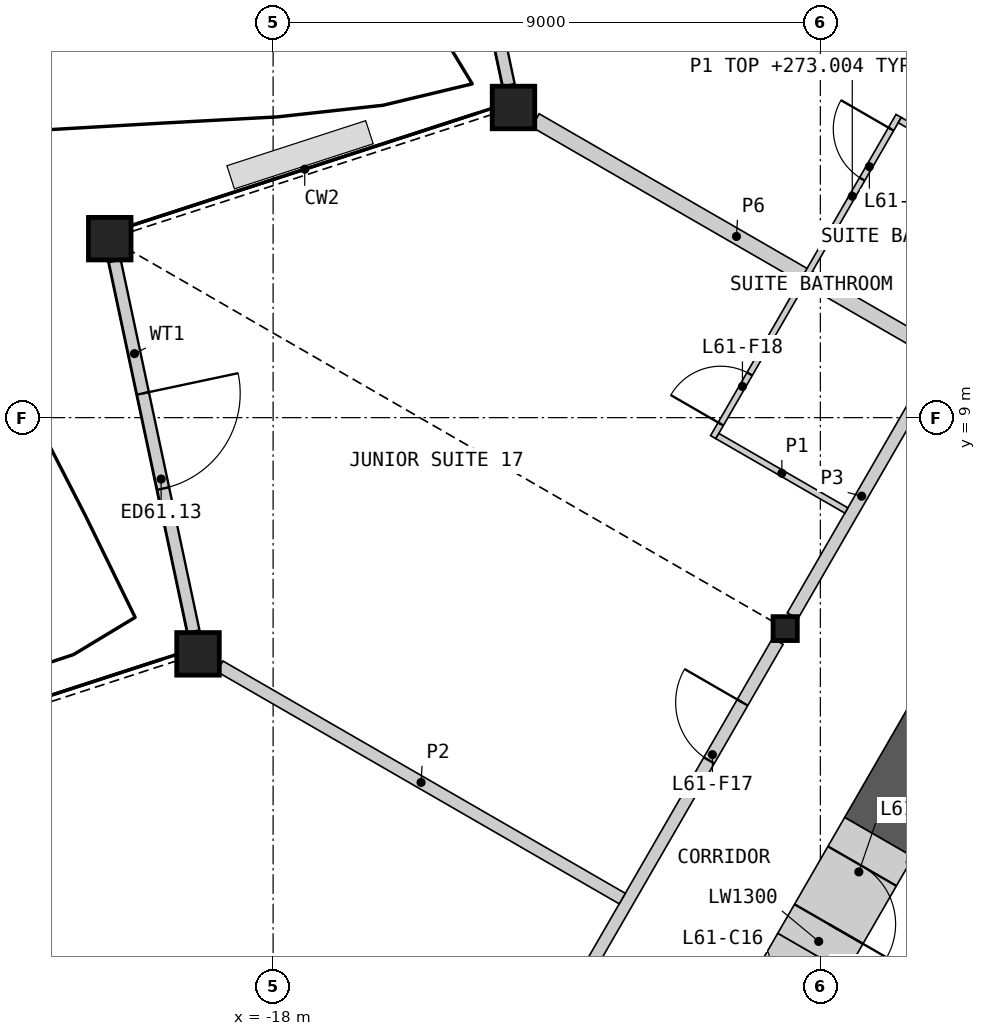
"""IFC4 building model, lengths in metres.
Left out: names, types, materials, properties, quantities, classifications, styles, units other than length and angle.
Written with IfcOpenShell. Run it as: python <this file> out.ifc"""

import sys

from ifc_helpers import new_model, si_unit, direction, frame, frame_2d, origin, origin_2d, place, context, subcontext, project, spatial, rectangle, hollow_rectangle, i_section, extrude, element, fill, save


model = new_model("IFC4")
c1 = context("Model", 3, precision=1e-05, world=origin(), true_north=direction((0.0, 1.0)))
c2 = subcontext(c1, "Body", "Model", "MODEL_VIEW")
j1 = project(units=[si_unit("LENGTHUNIT", "METRE"), si_unit("PLANEANGLEUNIT", "RADIAN")], contexts=[c1])
p1 = place(None, origin())
s1 = spatial("IfcSite", under=j1, at=p1, CompositionType="ELEMENT")
p2 = place(p1, origin())
s2 = spatial("IfcBuilding", under=s1, at=p2, CompositionType="ELEMENT")
p3 = place(p2, frame((0.0, 0.0, 270.6)))
s3 = spatial("IfcBuildingStorey", under=s2, at=p3, CompositionType="ELEMENT", Elevation=270.6)
for number, where, z_axis, x_axis in (
    (1, (-14.047, 14.101, 0.0), (0.0, 0.0, 1.0), (1.0, 0.0, 0.0)),
    (2, (-20.687, 11.943, 0.0), (0.0, 0.0, 1.0), (1.0, 0.0, 0.0)),
    (3, (-19.235, 5.115, 0.0), (0.0, 0.0, 1.0), (1.0, 0.0, 0.0)),
):
    element("IfcColumn", number, at=place(p3, frame(where, z_axis=z_axis, x_axis=x_axis)), inside=s3, PredefinedType="COLUMN", context=c2, shape_type="SweptSolid", body=[
        extrude(hollow_rectangle(XDim=0.7, YDim=0.7, WallThickness=0.045, at=origin_2d()), origin(), (0.0, 0.0, 1.0), 3.6),
    ])
p4 = place(p3, frame((-9.578, 5.53, 0.0), z_axis=(0.0, 0.0, 1.0), x_axis=(1.0, 0.0, 0.0)))
e4 = element("IfcColumn", 4, at=p4, inside=s3, PredefinedType="COLUMN", context=c2, shape_type="SweptSolid", body=[
    extrude(i_section(OverallWidth=0.399, OverallDepth=0.393, WebThickness=0.023, FlangeThickness=0.037, at=origin_2d()), origin(), (0.0, 0.0, 1.0), 3.6),
])
p5 = place(p3, frame((-15.42, 20.563, 0.0), z_axis=(0.0, 0.0, 1.0), x_axis=(0.207907484076, -0.978148494895, 0.0)))
e5 = element("IfcWall", 5, at=p5, inside=s3, PredefinedType="SOLIDWALL", context=c2, shape_type="SweptSolid", body=[
    extrude(rectangle(XDim=6.232, YDim=0.2, at=frame_2d((3.116, 0.0))), origin(), (0.0, 0.0, 1.0), 2.701),
])
p6 = place(p5, frame((2.232, 0.0, 0.0)))
e6 = element("IfcOpeningElement", 6, at=p6, cuts=e5, PredefinedType="OPENING", context=c2, shape_type="SweptSolid", body=[
    extrude(rectangle(XDim=1.6, YDim=2.4, at=frame_2d((0.8, 1.2))), frame((0.0, 0.11, 0.0), z_axis=(0.0, -1.0, 0.0), x_axis=(1.0, 0.0, 0.0)), (0.0, 0.0, 1.0), 0.22),
])
p7 = place(p3, frame((-20.604, 11.577, 0.0), z_axis=(0.0, 0.0, 1.0), x_axis=(0.207907484076, -0.978148494895, 0.0)))
e7 = element("IfcWall", 7, at=p7, inside=s3, PredefinedType="SOLIDWALL", context=c2, shape_type="SweptSolid", body=[
    extrude(rectangle(XDim=6.232, YDim=0.2, at=frame_2d((3.116, 0.0))), origin(), (0.0, 0.0, 1.0), 2.701),
])
p8 = place(p7, frame((2.227, 0.0, 0.0)))
e8 = element("IfcOpeningElement", 8, at=p8, cuts=e7, PredefinedType="OPENING", context=c2, shape_type="SweptSolid", body=[
    extrude(rectangle(XDim=1.6, YDim=2.4, at=frame_2d((0.8, 1.2))), frame((0.0, 0.11, 0.0), z_axis=(0.0, -1.0, 0.0), x_axis=(1.0, 0.0, 0.0)), (0.0, 0.0, 1.0), 0.22),
])
p9 = place(p3, frame((-3.812, 9.418, 0.0), z_axis=(0.0, 0.0, 1.0), x_axis=(-0.499995037753, -0.86602826872, 0.0)))
e9 = element("IfcWall", 9, at=p9, inside=s3, PredefinedType="SHEAR", context=c2, shape_type="SweptSolid", body=[
    extrude(rectangle(XDim=8.451, YDim=1.3, at=frame_2d((4.225, 0.0))), origin(), (0.0, 0.0, 1.0), 3.25),
])
p10 = place(p3, frame((-9.137, 0.195, 0.0), z_axis=(0.0, 0.0, 1.0), x_axis=(-0.500009943768, -0.866019662671, 0.0)))
e10 = element("IfcWall", 10, at=p10, inside=s3, PredefinedType="SHEAR", context=c2, shape_type="SweptSolid", body=[
    extrude(rectangle(XDim=2.401, YDim=1.3, at=frame_2d((1.201, 0.0))), origin(), (0.0, 0.0, 1.0), 3.25),
])
p11 = place(p10, frame((0.8, 0.0, 0.0)))
e11 = element("IfcOpeningElement", 11, at=p11, cuts=e10, PredefinedType="OPENING", context=c2, shape_type="SweptSolid", body=[
    extrude(rectangle(XDim=1.0, YDim=2.1, at=frame_2d((0.5, 1.05))), frame((0.0, 0.66, 0.0), z_axis=(0.0, -1.0, 0.0), x_axis=(1.0, 0.0, 0.0)), (0.0, 0.0, 1.0), 1.32),
])
p12 = place(p3, frame((-8.037, 2.1, 0.0), z_axis=(0.0, 0.0, 1.0), x_axis=(-0.50002983664, -0.866008176907, 0.0)))
e12 = element("IfcWall", 12, at=p12, inside=s3, PredefinedType="SHEAR", context=c2, shape_type="SweptSolid", body=[
    extrude(rectangle(XDim=2.2, YDim=1.3, at=frame_2d((1.1, 0.0))), origin(), (0.0, 0.0, 1.0), 3.25),
])
p13 = place(p12, frame((0.55, 0.0, 0.0)))
e13 = element("IfcOpeningElement", 13, at=p13, cuts=e12, PredefinedType="OPENING", context=c2, shape_type="SweptSolid", body=[
    extrude(rectangle(XDim=1.1, YDim=2.1, at=frame_2d((0.55, 1.05))), frame((0.0, 0.66, 0.0), z_axis=(0.0, -1.0, 0.0), x_axis=(1.0, 0.0, 0.0)), (0.0, 0.0, 1.0), 1.32),
])
p14 = place(p3, frame((-14.247, -2.556, 0.0), z_axis=(0.0, 0.0, 1.0), x_axis=(0.49998193945, 0.866035830797, 0.0)))
e14 = element("IfcWall", 14, at=p14, inside=s3, PredefinedType="PARTITIONING", context=c2, shape_type="SweptSolid", body=[
    extrude(rectangle(XDim=9.094, YDim=0.2, at=frame_2d((4.547, 0.0))), origin(), (0.0, 0.0, 1.0), 3.25),
])
p15 = place(p14, frame((6.833, 0.0, 0.0)))
e15 = element("IfcOpeningElement", 15, at=p15, cuts=e14, PredefinedType="OPENING", context=c2, shape_type="SweptSolid", body=[
    extrude(rectangle(XDim=1.1, YDim=2.1, at=frame_2d((0.55, 1.05))), frame((0.0, 0.11, 0.0), z_axis=(0.0, -1.0, 0.0), x_axis=(1.0, 0.0, 0.0)), (0.0, 0.0, 1.0), 0.22),
])
p16 = place(p3, frame((-9.458, 5.74, 0.0), z_axis=(0.0, 0.0, 1.0), x_axis=(0.50000207303, 0.866024206917, 0.0)))
e16 = element("IfcWall", 16, at=p16, inside=s3, PredefinedType="PARTITIONING", context=c2, shape_type="SweptSolid", body=[
    extrude(rectangle(XDim=9.095, YDim=0.2, at=frame_2d((4.547, 0.0))), origin(), (0.0, 0.0, 1.0), 3.25),
])
p17 = place(p3, frame((-13.687, 13.889, 0.0), z_axis=(0.0, 0.0, 1.0), x_axis=(0.866041332704, -0.499972409287, 0.0)))
e17 = element("IfcWall", 17, at=p17, inside=s3, PredefinedType="PARTITIONING", context=c2, shape_type="SweptSolid", body=[
    extrude(rectangle(XDim=7.638, YDim=0.25, at=frame_2d((3.819, 0.0))), origin(), (0.0, 0.0, 1.0), 2.404),
])
p18 = place(p3, frame((-18.875, 4.91, 0.0), z_axis=(0.0, 0.0, 1.0), x_axis=(0.866018509426, -0.50001194119, 0.0)))
e18 = element("IfcWall", 18, at=p18, inside=s3, PredefinedType="PARTITIONING", context=c2, shape_type="SweptSolid", body=[
    extrude(rectangle(XDim=7.641, YDim=0.2, at=frame_2d((3.82, 0.0))), origin(), (0.0, 0.0, 1.0), 2.404),
])
p19 = place(p3, frame((-10.762, 8.679, 0.0), z_axis=(0.0, 0.0, 1.0), x_axis=(0.500008851346, 0.866020293397, 0.0)))
e19 = element("IfcWall", 19, at=p19, inside=s3, PredefinedType="PARTITIONING", context=c2, shape_type="SweptSolid", body=[
    extrude(rectangle(XDim=6.1, YDim=0.1, at=frame_2d((3.05, 0.0))), origin(), (0.0, 0.0, 1.0), 2.404),
])
p20 = place(p19, frame((4.9, 0.0, 0.0)))
e20 = element("IfcOpeningElement", 20, at=p20, cuts=e19, PredefinedType="OPENING", context=c2, shape_type="SweptSolid", body=[
    extrude(rectangle(XDim=0.95, YDim=2.1, at=frame_2d((0.475, 1.05))), frame((0.0, 0.06, 0.0), z_axis=(0.0, -1.0, 0.0), x_axis=(1.0, 0.0, 0.0)), (0.0, 0.0, 1.0), 0.12),
])
p21 = place(p19, frame((0.25, 0.0, 0.0)))
e21 = element("IfcOpeningElement", 21, at=p21, cuts=e19, PredefinedType="OPENING", context=c2, shape_type="SweptSolid", body=[
    extrude(rectangle(XDim=0.95, YDim=2.1, at=frame_2d((0.475, 1.05))), frame((0.0, 0.06, 0.0), z_axis=(0.0, -1.0, 0.0), x_axis=(1.0, 0.0, 0.0)), (0.0, 0.0, 1.0), 0.12),
])
p22 = place(p3, frame((-10.694, 8.698, 0.0), z_axis=(0.0, 0.0, 1.0), x_axis=(0.866032905446, -0.499987006516, 0.0)))
e22 = element("IfcWall", 22, at=p22, inside=s3, PredefinedType="PARTITIONING", context=c2, shape_type="SweptSolid", body=[
    extrude(rectangle(XDim=2.45, YDim=0.1, at=frame_2d((1.225, 0.0))), origin(), (0.0, 0.0, 1.0), 2.404),
])
p23 = place(p3, frame((-7.694, 13.894, 0.0), z_axis=(0.0, 0.0, 1.0), x_axis=(0.865989751695, -0.500061746146, 0.0)))
e23 = element("IfcWall", 23, at=p23, inside=s3, PredefinedType="PARTITIONING", context=c2, shape_type="SweptSolid", body=[
    extrude(rectangle(XDim=2.45, YDim=0.1, at=frame_2d((1.225, 0.0))), origin(), (0.0, 0.0, 1.0), 2.404),
])
p24 = place(p8, origin())
e24 = element("IfcDoor", 24, at=p24, inside=s3, OperationType="DOUBLE_DOOR_SINGLE_SWING", PredefinedType="DOOR", context=c2, shape_type="SweptSolid", body=[
    extrude(rectangle(XDim=1.6, YDim=2.4, at=frame_2d((0.8, 1.2))), frame((0.0, 0.025, 0.0), z_axis=(0.0, -1.0, 0.0), x_axis=(1.0, 0.0, 0.0)), (0.0, 0.0, 1.0), 0.05),
])
fill(e8, e24)
p25 = place(p13, origin())
e25 = element("IfcDoor", 25, at=p25, inside=s3, OperationType="SINGLE_SWING_RIGHT", PredefinedType="DOOR", context=c2, shape_type="SweptSolid", body=[
    extrude(rectangle(XDim=1.1, YDim=2.1, at=frame_2d((0.55, 1.05))), frame((0.0, 0.405, 0.0), z_axis=(0.0, -1.0, 0.0), x_axis=(1.0, 0.0, 0.0)), (0.0, 0.0, 1.0), 0.05),
])
fill(e13, e25)
p26 = place(p20, origin())
e26 = element("IfcDoor", 26, at=p26, inside=s3, OperationType="SINGLE_SWING_RIGHT", PredefinedType="DOOR", context=c2, shape_type="SweptSolid", body=[
    extrude(rectangle(XDim=0.95, YDim=2.1, at=frame_2d((0.475, 1.05))), frame((0.0, 0.025, 0.0), z_axis=(0.0, -1.0, 0.0), x_axis=(1.0, 0.0, 0.0)), (0.0, 0.0, 1.0), 0.05),
])
fill(e20, e26)
p27 = place(p15, origin())
e27 = element("IfcDoor", 27, at=p27, inside=s3, OperationType="SINGLE_SWING_RIGHT", PredefinedType="DOOR", context=c2, shape_type="SweptSolid", body=[
    extrude(rectangle(XDim=1.1, YDim=2.1, at=frame_2d((0.55, 1.05))), frame((0.0, 0.025, 0.0), z_axis=(0.0, -1.0, 0.0), x_axis=(1.0, 0.0, 0.0)), (0.0, 0.0, 1.0), 0.05),
])
fill(e15, e27)
p28 = place(p21, origin())
e28 = element("IfcDoor", 28, at=p28, inside=s3, OperationType="SINGLE_SWING_LEFT", PredefinedType="DOOR", context=c2, shape_type="SweptSolid", body=[
    extrude(rectangle(XDim=0.95, YDim=2.1, at=frame_2d((0.475, 1.05))), frame((0.0, 0.025, 0.0), z_axis=(0.0, -1.0, 0.0), x_axis=(1.0, 0.0, 0.0)), (0.0, 0.0, 1.0), 0.05),
])
fill(e21, e28)
save(model, sys.argv[1])
